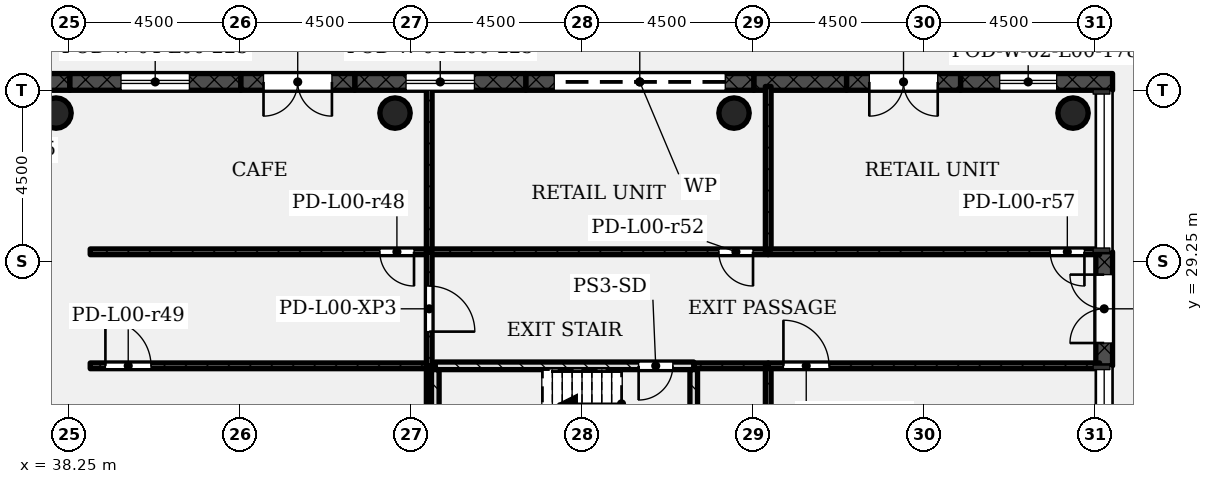
"""IFC4 building model, lengths in metres.
Left out: names, types, materials, properties, quantities, classifications, styles, units other than length and angle.
Written with IfcOpenShell. Run it as: python <this file> out.ifc"""

import sys

from ifc_helpers import new_model, si_unit, direction, frame, frame_2d, origin, origin_2d, place, context, subcontext, project, spatial, rectangle, hollow_circle, extrude, element, fill, save


model = new_model("IFC4")
c1 = context("Model", 3, precision=1e-05, world=origin(), true_north=direction((0.0, 1.0)))
c2 = subcontext(c1, "Body", "Model", "MODEL_VIEW")
j1 = project(units=[si_unit("LENGTHUNIT", "METRE"), si_unit("PLANEANGLEUNIT", "RADIAN")], contexts=[c1])
p1 = place(None, origin())
s1 = spatial("IfcSite", under=j1, at=p1, CompositionType="ELEMENT")
p2 = place(p1, origin())
s2 = spatial("IfcBuilding", under=s1, at=p2, CompositionType="ELEMENT")
p3 = place(p2, origin())
s3 = spatial("IfcBuildingStorey", under=s2, at=p3, CompositionType="ELEMENT", Elevation=0.0)
for number, where, z_axis, x_axis in (
    (1, (37.89, 33.15, -0.4), (0.0, 0.0, 1.0), (1.0, 0.0, 0.0)),
    (2, (46.81, 33.15, -0.4), (0.0, 0.0, 1.0), (1.0, 0.0, 0.0)),
    (3, (55.73, 33.15, -0.4), (0.0, 0.0, 1.0), (1.0, 0.0, 0.0)),
    (4, (64.65, 33.15, -0.4), (0.0, 0.0, 1.0), (1.0, 0.0, 0.0)),
):
    element("IfcColumn", number, at=place(p3, frame(where, z_axis=z_axis, x_axis=x_axis)), inside=s3, PredefinedType="COLUMN", context=c2, shape_type="SweptSolid", body=[
        extrude(hollow_circle(Radius=0.4, WallThickness=0.028, at=origin_2d()), origin(), (0.0, 0.0, 1.0), 6.4),
    ])
p4 = place(p3, frame((65.47, 26.5, 0.0), z_axis=(0.0, 0.0, 1.0), x_axis=(0.0, 1.0, 0.0)))
e5 = element("IfcWall", 5, at=p4, inside=s3, PredefinedType="STANDARD", context=c2, shape_type="SweptSolid", body=[
    extrude(rectangle(XDim=3.0, YDim=0.44, at=frame_2d((1.5, 0.0))), origin(), (0.0, 0.0, 1.0), 5.7),
])
p5 = place(p4, frame((0.6, 0.0, 0.0)))
e6 = element("IfcOpeningElement", 6, at=p5, cuts=e5, PredefinedType="OPENING", context=c2, shape_type="SweptSolid", body=[
    extrude(rectangle(XDim=1.8, YDim=2.1, at=frame_2d((0.9, 1.05))), frame((0.0, 0.23, 0.0), z_axis=(0.0, -1.0, 0.0), x_axis=(1.0, 0.0, 0.0)), (0.0, 0.0, 1.0), 0.46),
])
p6 = place(p3, frame((65.69, 33.97, 0.0), z_axis=(0.0, 0.0, 1.0), x_axis=(-1.0, 0.0, 0.0)))
e7 = element("IfcWall", 7, at=p6, inside=s3, PredefinedType="STANDARD", context=c2, shape_type="SweptSolid", body=[
    extrude(rectangle(XDim=4.0, YDim=0.44, at=frame_2d((2.0, 0.0))), origin(), (0.0, 0.0, 1.0), 5.7),
])
p7 = place(p6, frame((1.47, 0.0, 1.0)))
e8 = element("IfcOpeningElement", 8, at=p7, cuts=e7, PredefinedType="OPENING", context=c2, shape_type="SweptSolid", body=[
    extrude(rectangle(XDim=1.5, YDim=1.2, at=frame_2d((0.75, 0.6))), frame((0.0, 0.23, 0.0), z_axis=(0.0, -1.0, 0.0), x_axis=(1.0, 0.0, 0.0)), (0.0, 0.0, 1.0), 0.46),
])
p8 = place(p3, frame((61.69, 33.97, 0.0), z_axis=(0.0, 0.0, 1.0), x_axis=(-1.0, 0.0, 0.0)))
e9 = element("IfcWall", 9, at=p8, inside=s3, PredefinedType="STANDARD", context=c2, shape_type="SweptSolid", body=[
    extrude(rectangle(XDim=3.0, YDim=0.44, at=frame_2d((1.5, 0.0))), origin(), (0.0, 0.0, 1.0), 5.7),
])
p9 = place(p8, frame((0.6, 0.0, 0.0)))
e10 = element("IfcOpeningElement", 10, at=p9, cuts=e9, PredefinedType="OPENING", context=c2, shape_type="SweptSolid", body=[
    extrude(rectangle(XDim=1.8, YDim=2.1, at=frame_2d((0.9, 1.05))), frame((0.0, 0.23, 0.0), z_axis=(0.0, -1.0, 0.0), x_axis=(1.0, 0.0, 0.0)), (0.0, 0.0, 1.0), 0.46),
])
p10 = place(p3, frame((58.69, 33.97, 0.0), z_axis=(0.0, 0.0, 1.0), x_axis=(-1.0, 0.0, 0.0)))
e11 = element("IfcWall", 11, at=p10, inside=s3, PredefinedType="STANDARD", context=c2, shape_type="SweptSolid", body=[
    extrude(rectangle(XDim=2.44, YDim=0.44, at=frame_2d((1.22, 0.0))), origin(), (0.0, 0.0, 1.0), 5.7),
])
p11 = place(p3, frame((56.25, 33.97, 0.0), z_axis=(0.0, 0.0, 1.0), x_axis=(-1.0, 0.0, 0.0)))
e12 = element("IfcWall", 12, at=p11, inside=s3, PredefinedType="STANDARD", context=c2, shape_type="SweptSolid", body=[
    extrude(rectangle(XDim=6.0, YDim=0.44, at=frame_2d((3.0, 0.0))), origin(), (0.0, 0.0, 1.0), 5.7),
])
p12 = place(p11, frame((0.75, 0.0, 0.0)))
e13 = element("IfcOpeningElement", 13, at=p12, cuts=e12, PredefinedType="OPENING", context=c2, shape_type="SweptSolid", body=[
    extrude(rectangle(XDim=4.5, YDim=4.5, at=frame_2d((2.25, 2.25))), frame((0.0, 0.23, 0.0), z_axis=(0.0, -1.0, 0.0), x_axis=(1.0, 0.0, 0.0)), (0.0, 0.0, 1.0), 0.46),
])
p13 = place(p3, frame((50.25, 33.97, 0.0), z_axis=(0.0, 0.0, 1.0), x_axis=(-1.0, 0.0, 0.0)))
e14 = element("IfcWall", 14, at=p13, inside=s3, PredefinedType="STANDARD", context=c2, shape_type="SweptSolid", body=[
    extrude(rectangle(XDim=4.5, YDim=0.44, at=frame_2d((2.25, 0.0))), origin(), (0.0, 0.0, 1.0), 5.7),
])
p14 = place(p13, frame((1.35, 0.0, 2.0)))
e15 = element("IfcOpeningElement", 15, at=p14, cuts=e14, PredefinedType="OPENING", context=c2, shape_type="SweptSolid", body=[
    extrude(rectangle(XDim=1.8, YDim=0.9, at=frame_2d((0.9, 0.45))), frame((0.0, 0.23, 0.0), z_axis=(0.0, -1.0, 0.0), x_axis=(1.0, 0.0, 0.0)), (0.0, 0.0, 1.0), 0.46),
])
p15 = place(p3, frame((45.75, 33.97, 0.0), z_axis=(0.0, 0.0, 1.0), x_axis=(-1.0, 0.0, 0.0)))
e16 = element("IfcWall", 16, at=p15, inside=s3, PredefinedType="STANDARD", context=c2, shape_type="SweptSolid", body=[
    extrude(rectangle(XDim=3.0, YDim=0.44, at=frame_2d((1.5, 0.0))), origin(), (0.0, 0.0, 1.0), 5.7),
])
p16 = place(p15, frame((0.6, 0.0, 0.0)))
e17 = element("IfcOpeningElement", 17, at=p16, cuts=e16, PredefinedType="OPENING", context=c2, shape_type="SweptSolid", body=[
    extrude(rectangle(XDim=1.8, YDim=2.4, at=frame_2d((0.9, 1.2))), frame((0.0, 0.23, 0.0), z_axis=(0.0, -1.0, 0.0), x_axis=(1.0, 0.0, 0.0)), (0.0, 0.0, 1.0), 0.46),
])
p17 = place(p3, frame((42.75, 33.97, 0.0), z_axis=(0.0, 0.0, 1.0), x_axis=(-1.0, 0.0, 0.0)))
e18 = element("IfcWall", 18, at=p17, inside=s3, PredefinedType="STANDARD", context=c2, shape_type="SweptSolid", body=[
    extrude(rectangle(XDim=4.5, YDim=0.44, at=frame_2d((2.25, 0.0))), origin(), (0.0, 0.0, 1.0), 5.7),
])
p18 = place(p17, frame((1.35, 0.0, 2.0)))
e19 = element("IfcOpeningElement", 19, at=p18, cuts=e18, PredefinedType="OPENING", context=c2, shape_type="SweptSolid", body=[
    extrude(rectangle(XDim=1.8, YDim=0.9, at=frame_2d((0.9, 0.45))), frame((0.0, 0.23, 0.0), z_axis=(0.0, -1.0, 0.0), x_axis=(1.0, 0.0, 0.0)), (0.0, 0.0, 1.0), 0.46),
])
p19 = place(p3, frame((38.25, 33.97, 0.0), z_axis=(0.0, 0.0, 1.0), x_axis=(-1.0, 0.0, 0.0)))
e20 = element("IfcWall", 20, at=p19, inside=s3, PredefinedType="STANDARD", context=c2, shape_type="SweptSolid", body=[
    extrude(rectangle(XDim=4.5, YDim=0.44, at=frame_2d((2.25, 0.0))), origin(), (0.0, 0.0, 1.0), 5.7),
])
p20 = place(p19, frame((1.05, 0.0, 0.0)))
e21 = element("IfcOpeningElement", 21, at=p20, cuts=e20, PredefinedType="OPENING", context=c2, shape_type="SweptSolid", body=[
    extrude(rectangle(XDim=2.4, YDim=2.1, at=frame_2d((1.2, 1.05))), frame((0.0, 0.23, 0.0), z_axis=(0.0, -1.0, 0.0), x_axis=(1.0, 0.0, 0.0)), (0.0, 0.0, 1.0), 0.46),
])
p21 = place(p3, frame((47.71, 29.5, 0.0), z_axis=(0.0, 0.0, 1.0), x_axis=(-1.0, 0.0, 0.0)))
e22 = element("IfcWall", 22, at=p21, inside=s3, PredefinedType="PARTITIONING", context=c2, shape_type="SweptSolid", body=[
    extrude(rectangle(XDim=8.92, YDim=0.15, at=frame_2d((4.46, 0.0))), origin(), (0.0, 0.0, 1.0), 5.58),
])
p22 = place(p21, frame((0.4, 0.0, 0.0)))
e23 = element("IfcOpeningElement", 23, at=p22, cuts=e22, PredefinedType="OPENING", context=c2, shape_type="SweptSolid", body=[
    extrude(rectangle(XDim=0.9, YDim=2.1, at=frame_2d((0.45, 1.05))), frame((0.0, 0.085, 0.0), z_axis=(0.0, -1.0, 0.0), x_axis=(1.0, 0.0, 0.0)), (0.0, 0.0, 1.0), 0.17),
])
p23 = place(p3, frame((47.71, 33.85, 0.0), z_axis=(0.0, 0.0, 1.0), x_axis=(0.0, -1.0, 0.0)))
e24 = element("IfcWall", 24, at=p23, inside=s3, PredefinedType="PARTITIONING", context=c2, shape_type="SweptSolid", body=[
    extrude(rectangle(XDim=4.35, YDim=0.15, at=frame_2d((2.175, 0.0))), origin(), (0.0, 0.0, 1.0), 5.58),
])
p24 = place(p3, frame((38.79, 26.5, 0.0), z_axis=(0.0, 0.0, 1.0), x_axis=(1.0, 0.0, 0.0)))
e25 = element("IfcWall", 25, at=p24, inside=s3, PredefinedType="PARTITIONING", context=c2, shape_type="SweptSolid", body=[
    extrude(rectangle(XDim=8.92, YDim=0.15, at=frame_2d((4.46, 0.0))), origin(), (0.0, 0.0, 1.0), 5.58),
])
p25 = place(p24, frame((0.4, 0.0, 0.0)))
e26 = element("IfcOpeningElement", 26, at=p25, cuts=e25, PredefinedType="OPENING", context=c2, shape_type="SweptSolid", body=[
    extrude(rectangle(XDim=1.2, YDim=2.1, at=frame_2d((0.6, 1.05))), frame((0.0, 0.085, 0.0), z_axis=(0.0, -1.0, 0.0), x_axis=(1.0, 0.0, 0.0)), (0.0, 0.0, 1.0), 0.17),
])
p26 = place(p3, frame((47.71, 26.5, 0.0), z_axis=(0.0, 0.0, 1.0), x_axis=(0.0, -1.0, 0.0)))
e27 = element("IfcWall", 27, at=p26, inside=s3, PredefinedType="PARTITIONING", context=c2, shape_type="SweptSolid", body=[
    extrude(rectangle(XDim=20.5, YDim=0.15, at=frame_2d((10.25, 0.0))), origin(), (0.0, 0.0, 1.0), 5.58),
])
p27 = place(p3, frame((56.63, 29.5, 0.0), z_axis=(0.0, 0.0, 1.0), x_axis=(-1.0, 0.0, 0.0)))
e28 = element("IfcWall", 28, at=p27, inside=s3, PredefinedType="PARTITIONING", context=c2, shape_type="SweptSolid", body=[
    extrude(rectangle(XDim=8.92, YDim=0.15, at=frame_2d((4.46, 0.0))), origin(), (0.0, 0.0, 1.0), 5.58),
])
p28 = place(p27, frame((0.4, 0.0, 0.0)))
e29 = element("IfcOpeningElement", 29, at=p28, cuts=e28, PredefinedType="OPENING", context=c2, shape_type="SweptSolid", body=[
    extrude(rectangle(XDim=0.9, YDim=2.1, at=frame_2d((0.45, 1.05))), frame((0.0, 0.085, 0.0), z_axis=(0.0, -1.0, 0.0), x_axis=(1.0, 0.0, 0.0)), (0.0, 0.0, 1.0), 0.17),
])
p29 = place(p3, frame((56.63, 33.85, 0.0), z_axis=(0.0, 0.0, 1.0), x_axis=(0.0, -1.0, 0.0)))
e30 = element("IfcWall", 30, at=p29, inside=s3, PredefinedType="PARTITIONING", context=c2, shape_type="SweptSolid", body=[
    extrude(rectangle(XDim=4.35, YDim=0.15, at=frame_2d((2.175, 0.0))), origin(), (0.0, 0.0, 1.0), 5.58),
])
p30 = place(p3, frame((54.67, 26.5, 0.0), z_axis=(0.0, 0.0, 1.0), x_axis=(1.0, 0.0, 0.0)))
e31 = element("IfcWall", 31, at=p30, inside=s3, PredefinedType="PARTITIONING", context=c2, shape_type="SweptSolid", body=[
    extrude(rectangle(XDim=1.96, YDim=0.15, at=frame_2d((0.98, 0.0))), origin(), (0.0, 0.0, 1.0), 5.58),
])
p31 = place(p3, frame((56.63, 26.5, 0.0), z_axis=(0.0, 0.0, 1.0), x_axis=(0.0, -1.0, 0.0)))
e32 = element("IfcWall", 32, at=p31, inside=s3, PredefinedType="PARTITIONING", context=c2, shape_type="SweptSolid", body=[
    extrude(rectangle(XDim=25.0, YDim=0.15, at=frame_2d((12.5, 0.0))), origin(), (0.0, 0.0, 1.0), 5.58),
])
p32 = place(p3, frame((65.35, 29.5, 0.0), z_axis=(0.0, 0.0, 1.0), x_axis=(-1.0, 0.0, 0.0)))
e33 = element("IfcWall", 33, at=p32, inside=s3, PredefinedType="PARTITIONING", context=c2, shape_type="SweptSolid", body=[
    extrude(rectangle(XDim=8.72, YDim=0.15, at=frame_2d((4.36, 0.0))), origin(), (0.0, 0.0, 1.0), 5.58),
])
p33 = place(p32, frame((0.4, 0.0, 0.0)))
e34 = element("IfcOpeningElement", 34, at=p33, cuts=e33, PredefinedType="OPENING", context=c2, shape_type="SweptSolid", body=[
    extrude(rectangle(XDim=0.9, YDim=2.1, at=frame_2d((0.45, 1.05))), frame((0.0, 0.085, 0.0), z_axis=(0.0, -1.0, 0.0), x_axis=(1.0, 0.0, 0.0)), (0.0, 0.0, 1.0), 0.17),
])
p34 = place(p3, frame((56.63, 26.5, 0.0), z_axis=(0.0, 0.0, 1.0), x_axis=(1.0, 0.0, 0.0)))
e35 = element("IfcWall", 35, at=p34, inside=s3, PredefinedType="PARTITIONING", context=c2, shape_type="SweptSolid", body=[
    extrude(rectangle(XDim=8.72, YDim=0.15, at=frame_2d((4.36, 0.0))), origin(), (0.0, 0.0, 1.0), 5.58),
])
p35 = place(p34, frame((0.4, 0.0, 0.0)))
e36 = element("IfcOpeningElement", 36, at=p35, cuts=e35, PredefinedType="OPENING", context=c2, shape_type="SweptSolid", body=[
    extrude(rectangle(XDim=1.2, YDim=2.1, at=frame_2d((0.6, 1.05))), frame((0.0, 0.085, 0.0), z_axis=(0.0, -1.0, 0.0), x_axis=(1.0, 0.0, 0.0)), (0.0, 0.0, 1.0), 0.17),
])
p36 = place(p3, frame((47.71, 26.5, 0.0), z_axis=(0.0, 0.0, 1.0), x_axis=(0.0, 1.0, 0.0)))
e37 = element("IfcWall", 37, at=p36, inside=s3, PredefinedType="PARTITIONING", context=c2, shape_type="SweptSolid", body=[
    extrude(rectangle(XDim=3.0, YDim=0.15, at=frame_2d((1.5, 0.0))), origin(), (0.0, 0.0, 1.0), 5.58),
])
p37 = place(p36, frame((0.9, 0.0, 0.0)))
e38 = element("IfcOpeningElement", 38, at=p37, cuts=e37, PredefinedType="OPENING", context=c2, shape_type="SweptSolid", body=[
    extrude(rectangle(XDim=1.2, YDim=2.1, at=frame_2d((0.6, 1.05))), frame((0.0, 0.085, 0.0), z_axis=(0.0, -1.0, 0.0), x_axis=(1.0, 0.0, 0.0)), (0.0, 0.0, 1.0), 0.17),
])
p38 = place(p3, frame((47.87, 26.5, 0.0), z_axis=(0.0, 0.0, 1.0), x_axis=(1.0, 0.0, 0.0)))
e39 = element("IfcWall", 39, at=p38, inside=s3, PredefinedType="SHEAR", context=c2, shape_type="SweptSolid", body=[
    extrude(rectangle(XDim=6.8, YDim=0.2, at=frame_2d((3.4, 0.0))), origin(), (0.0, 0.0, 1.0), 5.58),
])
p39 = place(p38, frame((5.35, 0.0, 0.0)))
e40 = element("IfcOpeningElement", 40, at=p39, cuts=e39, PredefinedType="OPENING", context=c2, shape_type="SweptSolid", body=[
    extrude(rectangle(XDim=0.9, YDim=2.1, at=frame_2d((0.45, 1.05))), frame((0.0, 0.11, 0.0), z_axis=(0.0, -1.0, 0.0), x_axis=(1.0, 0.0, 0.0)), (0.0, 0.0, 1.0), 0.22),
])
for number, where, z_axis, x_axis in (
    (41, (47.87, 22.65, 0.0), (0.0, 0.0, 1.0), (0.0, 1.0, 0.0)),
    (42, (54.67, 22.65, 0.0), (0.0, 0.0, 1.0), (0.0, 1.0, 0.0)),
):
    element("IfcWall", number, at=place(p3, frame(where, z_axis=z_axis, x_axis=x_axis)), inside=s3, PredefinedType="SHEAR", context=c2, shape_type="SweptSolid", body=[
        extrude(rectangle(XDim=3.75, YDim=0.2, at=frame_2d((1.875, 0.0))), origin(), (0.0, 0.0, 1.0), 5.58),
    ])
p40 = place(p5, origin())
e43 = element("IfcDoor", 43, at=p40, inside=s3, OperationType="DOUBLE_DOOR_DOUBLE_SWING", PredefinedType="DOOR", context=c2, shape_type="SweptSolid", body=[
    extrude(rectangle(XDim=1.8, YDim=2.1, at=frame_2d((0.9, 1.05))), frame((0.0, 0.025, 0.0), z_axis=(0.0, -1.0, 0.0), x_axis=(1.0, 0.0, 0.0)), (0.0, 0.0, 1.0), 0.05),
])
fill(e6, e43)
p41 = place(p7, origin())
e44 = element("IfcWindow", 44, at=p41, inside=s3, PartitioningType="SINGLE_PANEL", PredefinedType="WINDOW", context=c2, shape_type="SweptSolid", body=[
    extrude(rectangle(XDim=1.5, YDim=1.2, at=frame_2d((0.75, 0.6))), frame((0.0, 0.03, 0.0), z_axis=(0.0, -1.0, 0.0), x_axis=(1.0, 0.0, 0.0)), (0.0, 0.0, 1.0), 0.06),
])
fill(e8, e44)
p42 = place(p9, origin())
e45 = element("IfcDoor", 45, at=p42, inside=s3, OperationType="DOUBLE_DOOR_DOUBLE_SWING", PredefinedType="DOOR", context=c2, shape_type="SweptSolid", body=[
    extrude(rectangle(XDim=1.8, YDim=2.1, at=frame_2d((0.9, 1.05))), frame((0.0, 0.025, 0.0), z_axis=(0.0, -1.0, 0.0), x_axis=(1.0, 0.0, 0.0)), (0.0, 0.0, 1.0), 0.05),
])
fill(e10, e45)
p43 = place(p12, origin())
e46 = element("IfcDoor", 46, at=p43, inside=s3, OperationType="ROLLINGUP", PredefinedType="DOOR", context=c2, shape_type="SweptSolid", body=[
    extrude(rectangle(XDim=4.5, YDim=4.5, at=frame_2d((2.25, 2.25))), frame((0.0, 0.025, 0.0), z_axis=(0.0, -1.0, 0.0), x_axis=(1.0, 0.0, 0.0)), (0.0, 0.0, 1.0), 0.05),
])
fill(e13, e46)
p44 = place(p14, origin())
e47 = element("IfcWindow", 47, at=p44, inside=s3, PartitioningType="SINGLE_PANEL", PredefinedType="WINDOW", context=c2, shape_type="SweptSolid", body=[
    extrude(rectangle(XDim=1.8, YDim=0.9, at=frame_2d((0.9, 0.45))), frame((0.0, 0.03, 0.0), z_axis=(0.0, -1.0, 0.0), x_axis=(1.0, 0.0, 0.0)), (0.0, 0.0, 1.0), 0.06),
])
fill(e15, e47)
p45 = place(p16, origin())
e48 = element("IfcDoor", 48, at=p45, inside=s3, OperationType="DOUBLE_DOOR_DOUBLE_SWING", PredefinedType="DOOR", context=c2, shape_type="SweptSolid", body=[
    extrude(rectangle(XDim=1.8, YDim=2.4, at=frame_2d((0.9, 1.2))), frame((0.0, 0.025, 0.0), z_axis=(0.0, -1.0, 0.0), x_axis=(1.0, 0.0, 0.0)), (0.0, 0.0, 1.0), 0.05),
])
fill(e17, e48)
p46 = place(p18, origin())
e49 = element("IfcWindow", 49, at=p46, inside=s3, PartitioningType="SINGLE_PANEL", PredefinedType="WINDOW", context=c2, shape_type="SweptSolid", body=[
    extrude(rectangle(XDim=1.8, YDim=0.9, at=frame_2d((0.9, 0.45))), frame((0.0, 0.03, 0.0), z_axis=(0.0, -1.0, 0.0), x_axis=(1.0, 0.0, 0.0)), (0.0, 0.0, 1.0), 0.06),
])
fill(e19, e49)
p47 = place(p22, origin())
e50 = element("IfcDoor", 50, at=p47, inside=s3, OperationType="SINGLE_SWING_RIGHT", PredefinedType="DOOR", context=c2, shape_type="SweptSolid", body=[
    extrude(rectangle(XDim=0.9, YDim=2.1, at=frame_2d((0.45, 1.05))), frame((0.0, 0.025, 0.0), z_axis=(0.0, -1.0, 0.0), x_axis=(1.0, 0.0, 0.0)), (0.0, 0.0, 1.0), 0.05),
])
fill(e23, e50)
p48 = place(p25, origin())
e51 = element("IfcDoor", 51, at=p48, inside=s3, OperationType="SINGLE_SWING_RIGHT", PredefinedType="DOOR", context=c2, shape_type="SweptSolid", body=[
    extrude(rectangle(XDim=1.2, YDim=2.1, at=frame_2d((0.6, 1.05))), frame((0.0, 0.025, 0.0), z_axis=(0.0, -1.0, 0.0), x_axis=(1.0, 0.0, 0.0)), (0.0, 0.0, 1.0), 0.05),
])
fill(e26, e51)
p49 = place(p28, origin())
e52 = element("IfcDoor", 52, at=p49, inside=s3, OperationType="SINGLE_SWING_RIGHT", PredefinedType="DOOR", context=c2, shape_type="SweptSolid", body=[
    extrude(rectangle(XDim=0.9, YDim=2.1, at=frame_2d((0.45, 1.05))), frame((0.0, 0.025, 0.0), z_axis=(0.0, -1.0, 0.0), x_axis=(1.0, 0.0, 0.0)), (0.0, 0.0, 1.0), 0.05),
])
fill(e29, e52)
p50 = place(p33, origin())
e53 = element("IfcDoor", 53, at=p50, inside=s3, OperationType="SINGLE_SWING_RIGHT", PredefinedType="DOOR", context=c2, shape_type="SweptSolid", body=[
    extrude(rectangle(XDim=0.9, YDim=2.1, at=frame_2d((0.45, 1.05))), frame((0.0, 0.025, 0.0), z_axis=(0.0, -1.0, 0.0), x_axis=(1.0, 0.0, 0.0)), (0.0, 0.0, 1.0), 0.05),
])
fill(e34, e53)
p51 = place(p35, origin())
e54 = element("IfcDoor", 54, at=p51, inside=s3, OperationType="SINGLE_SWING_RIGHT", PredefinedType="DOOR", context=c2, shape_type="SweptSolid", body=[
    extrude(rectangle(XDim=1.2, YDim=2.1, at=frame_2d((0.6, 1.05))), frame((0.0, 0.025, 0.0), z_axis=(0.0, -1.0, 0.0), x_axis=(1.0, 0.0, 0.0)), (0.0, 0.0, 1.0), 0.05),
])
fill(e36, e54)
p52 = place(p37, origin())
e55 = element("IfcDoor", 55, at=p52, inside=s3, OperationType="SINGLE_SWING_LEFT", PredefinedType="DOOR", context=c2, shape_type="SweptSolid", body=[
    extrude(rectangle(XDim=1.2, YDim=2.1, at=frame_2d((0.6, 1.05))), frame((0.0, 0.025, 0.0), z_axis=(0.0, -1.0, 0.0), x_axis=(1.0, 0.0, 0.0)), (0.0, 0.0, 1.0), 0.05),
])
fill(e38, e55)
p53 = place(p39, origin())
e56 = element("IfcDoor", 56, at=p53, inside=s3, OperationType="SINGLE_SWING_LEFT", PredefinedType="DOOR", context=c2, shape_type="SweptSolid", body=[
    extrude(rectangle(XDim=0.9, YDim=2.1, at=frame_2d((0.45, 1.05))), frame((0.0, 0.025, 0.0), z_axis=(0.0, -1.0, 0.0), x_axis=(1.0, 0.0, 0.0)), (0.0, 0.0, 1.0), 0.05),
])
fill(e40, e56)
save(model, sys.argv[1])
